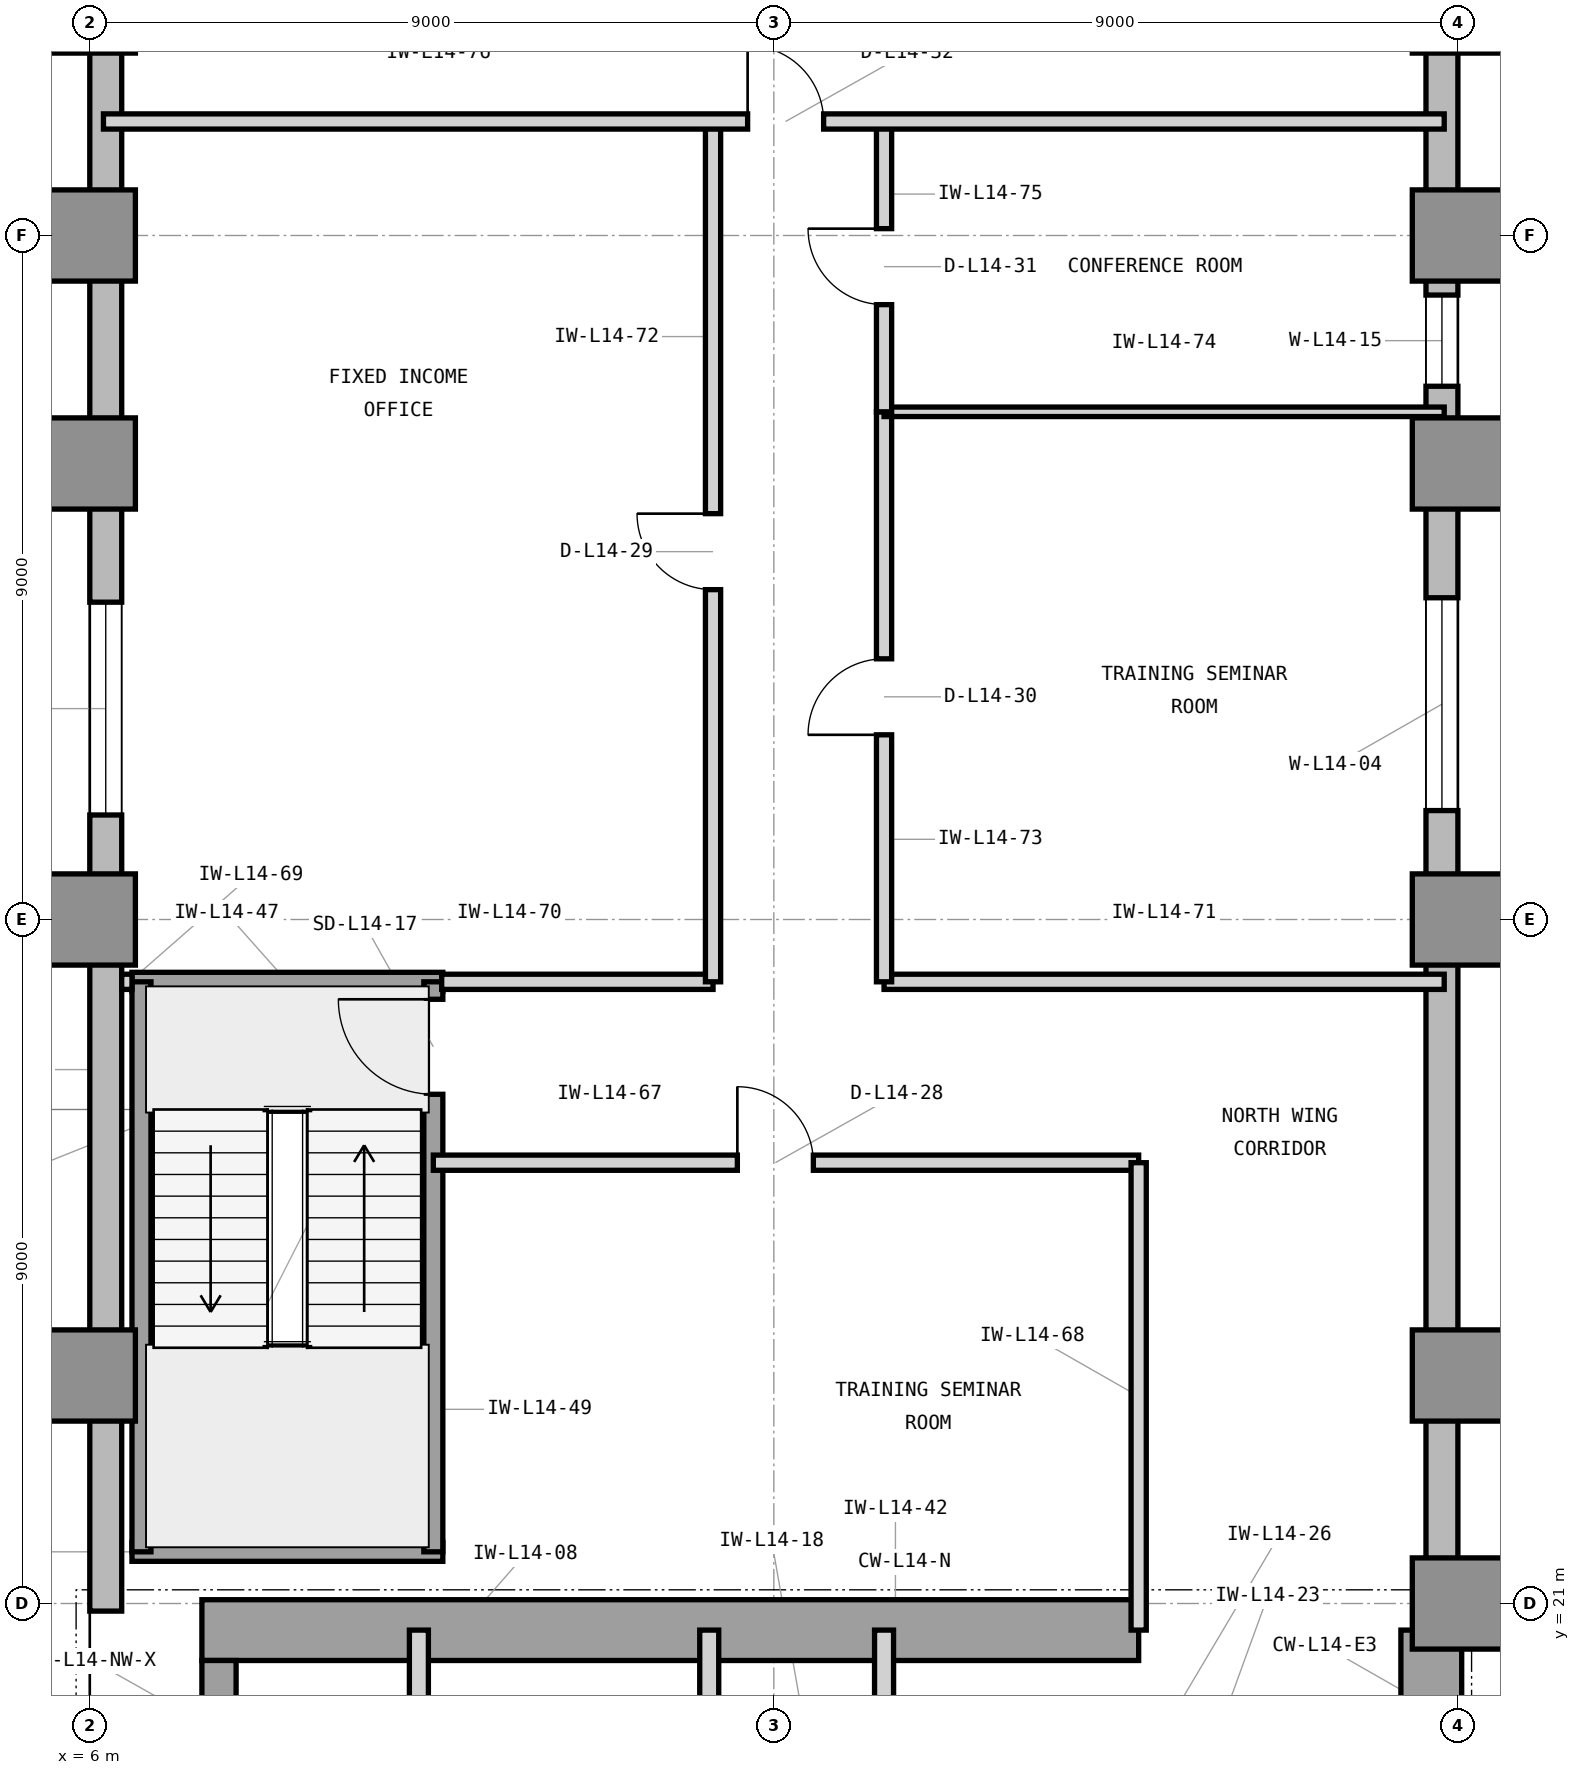
"""IFC4 building model, lengths in metres.
Left out: names, types, materials, properties, quantities, classifications, styles, units other than length and angle.
Written with IfcOpenShell. Run it as: python <this file> out.ifc"""

import sys

from ifc_helpers import new_model, si_unit, direction, frame, frame_2d, origin, origin_2d, place, context, subcontext, project, spatial, rectangle, extrude, element, fill, save


model = new_model("IFC4")
c1 = context("Model", 3, precision=1e-05, world=origin(), true_north=direction((0.0, 1.0)))
c2 = subcontext(c1, "Body", "Model", "MODEL_VIEW")
j1 = project(units=[si_unit("LENGTHUNIT", "METRE"), si_unit("PLANEANGLEUNIT", "RADIAN")], contexts=[c1])
p1 = place(None, origin())
s1 = spatial("IfcSite", under=j1, at=p1, CompositionType="ELEMENT")
p2 = place(p1, origin())
s2 = spatial("IfcBuilding", under=s1, at=p2, CompositionType="ELEMENT")
p3 = place(p2, frame((0.0, 0.0, 63.6)))
s3 = spatial("IfcBuildingStorey", under=s2, at=p3, CompositionType="ELEMENT", Elevation=63.6)
p4 = place(p3, frame((7.475, 20.65, 0.0), z_axis=(0.0, 0.0, 1.0), x_axis=(1.0, 0.0, 0.0)))
e1 = element("IfcWall", 1, at=p4, inside=s3, PredefinedType="SHEAR", context=c2, shape_type="SweptSolid", body=[
    extrude(rectangle(XDim=12.325, YDim=0.8, at=frame_2d((6.163, 0.0))), origin(), (0.0, 0.0, 1.0), 4.2),
])
p5 = place(p3, frame((23.65, 16.6, 0.0), z_axis=(0.0, 0.0, 1.0), x_axis=(0.0, 1.0, 0.0)))
e2 = element("IfcWall", 2, at=p5, inside=s3, PredefinedType="SHEAR", context=c2, shape_type="SweptSolid", body=[
    extrude(rectangle(XDim=4.05, YDim=0.8, at=frame_2d((2.025, 0.0))), origin(), (0.0, 0.0, 1.0), 4.2),
])
p6 = place(p3, frame((7.7, 19.575, 0.0), z_axis=(0.0, 0.0, 1.0), x_axis=(0.0, 1.0, 0.0)))
e3 = element("IfcWall", 3, at=p6, inside=s3, PredefinedType="SHEAR", context=c2, shape_type="SweptSolid", body=[
    extrude(rectangle(XDim=0.675, YDim=0.45, at=frame_2d((0.337, 0.0))), origin(), (0.0, 0.0, 1.0), 4.2),
])
for number, where, z_axis, x_axis in (
    (4, (24.0, 21.0, 0.0), (0.0, 0.0, 1.0), (1.0, 0.0, 0.0)),
    (5, (6.0, 24.0, 0.0), (0.0, 0.0, 1.0), (1.0, 0.0, 0.0)),
    (6, (24.0, 24.0, 0.0), (0.0, 0.0, 1.0), (1.0, 0.0, 0.0)),
    (7, (6.0, 30.0, 0.0), (0.0, 0.0, 1.0), (1.0, 0.0, 0.0)),
    (8, (24.0, 30.0, 0.0), (0.0, 0.0, 1.0), (1.0, 0.0, 0.0)),
    (9, (6.0, 36.0, 0.0), (0.0, 0.0, 1.0), (1.0, 0.0, 0.0)),
    (10, (24.0, 36.0, 0.0), (0.0, 0.0, 1.0), (1.0, 0.0, 0.0)),
    (11, (6.0, 39.0, 0.0), (0.0, 0.0, 1.0), (1.0, 0.0, 0.0)),
    (12, (24.0, 39.0, 0.0), (0.0, 0.0, 1.0), (1.0, 0.0, 0.0)),
    (13, (6.0, 42.0, 0.0), (0.0, 0.0, 1.0), (1.0, 0.0, 0.0)),
    (14, (24.0, 42.0, 0.0), (0.0, 0.0, 1.0), (1.0, 0.0, 0.0)),
):
    element("IfcColumn", number, at=place(p3, frame(where, z_axis=z_axis, x_axis=x_axis)), inside=s3, PredefinedType="COLUMN", context=c2, shape_type="SweptSolid", body=[
        extrude(rectangle(XDim=1.2, YDim=1.2, at=origin_2d()), origin(), (0.0, 0.0, 1.0), 4.2),
    ])
p7 = place(p3, frame((64.4, 20.79, 0.0), z_axis=(0.0, 0.0, 1.0), x_axis=(-1.0, 0.0, 0.0)))
e15 = element("IfcWall", 15, at=p7, inside=s3, PredefinedType="STANDARD", context=c2, shape_type="SweptSolid", body=[
    extrude(rectangle(XDim=40.4, YDim=0.42, at=frame_2d((20.2, 0.0))), origin(), (0.0, 0.0, 1.0), 3.98),
])
p8 = place(p7, frame((26.375, 0.0, 0.85)))
e16 = element("IfcOpeningElement", 16, at=p8, cuts=e15, PredefinedType="OPENING", context=c2, shape_type="SweptSolid", body=[
    extrude(rectangle(XDim=2.8, YDim=2.45, at=frame_2d((1.4, 1.225))), frame((0.0, 0.22, 0.0), z_axis=(0.0, -1.0, 0.0), x_axis=(1.0, 0.0, 0.0)), (0.0, 0.0, 1.0), 0.44),
])
p9 = place(p7, frame((38.222, 0.0, 0.85)))
e17 = element("IfcOpeningElement", 17, at=p9, cuts=e15, PredefinedType="OPENING", context=c2, shape_type="SweptSolid", body=[
    extrude(rectangle(XDim=1.2, YDim=2.45, at=frame_2d((0.6, 1.225))), frame((0.0, 0.22, 0.0), z_axis=(0.0, -1.0, 0.0), x_axis=(1.0, 0.0, 0.0)), (0.0, 0.0, 1.0), 0.44),
])
p10 = place(p7, frame((32.536, 0.0, 0.85)))
e18 = element("IfcOpeningElement", 18, at=p10, cuts=e15, PredefinedType="OPENING", context=c2, shape_type="SweptSolid", body=[
    extrude(rectangle(XDim=2.8, YDim=2.45, at=frame_2d((1.4, 1.225))), frame((0.0, 0.22, 0.0), z_axis=(0.0, -1.0, 0.0), x_axis=(1.0, 0.0, 0.0)), (0.0, 0.0, 1.0), 0.44),
])
p11 = place(p7, frame((17.386, 0.0, 0.85)))
e19 = element("IfcOpeningElement", 19, at=p11, cuts=e15, PredefinedType="OPENING", context=c2, shape_type="SweptSolid", body=[
    extrude(rectangle(XDim=2.8, YDim=2.45, at=frame_2d((1.4, 1.225))), frame((0.0, 0.22, 0.0), z_axis=(0.0, -1.0, 0.0), x_axis=(1.0, 0.0, 0.0)), (0.0, 0.0, 1.0), 0.44),
])
p12 = place(p3, frame((23.79, 21.0, 0.0), z_axis=(0.0, 0.0, 1.0), x_axis=(0.0, 1.0, 0.0)))
e20 = element("IfcWall", 20, at=p12, inside=s3, PredefinedType="STANDARD", context=c2, shape_type="SweptSolid", body=[
    extrude(rectangle(XDim=28.4, YDim=0.42, at=frame_2d((14.2, 0.0))), origin(), (0.0, 0.0, 1.0), 3.98),
])
p13 = place(p12, frame((10.433, 0.0, 0.85)))
e21 = element("IfcOpeningElement", 21, at=p13, cuts=e20, PredefinedType="OPENING", context=c2, shape_type="SweptSolid", body=[
    extrude(rectangle(XDim=2.8, YDim=2.45, at=frame_2d((1.4, 1.225))), frame((0.0, 0.22, 0.0), z_axis=(0.0, -1.0, 0.0), x_axis=(1.0, 0.0, 0.0)), (0.0, 0.0, 1.0), 0.44),
])
p14 = place(p12, frame((16.016, 0.0, 0.85)))
e22 = element("IfcOpeningElement", 22, at=p14, cuts=e20, PredefinedType="OPENING", context=c2, shape_type="SweptSolid", body=[
    extrude(rectangle(XDim=1.2, YDim=2.45, at=frame_2d((0.6, 1.225))), frame((0.0, 0.22, 0.0), z_axis=(0.0, -1.0, 0.0), x_axis=(1.0, 0.0, 0.0)), (0.0, 0.0, 1.0), 0.44),
])
p15 = place(p3, frame((6.21, 49.4, 0.0), z_axis=(0.0, 0.0, 1.0), x_axis=(0.0, -1.0, 0.0)))
e23 = element("IfcWall", 23, at=p15, inside=s3, PredefinedType="STANDARD", context=c2, shape_type="SweptSolid", body=[
    extrude(rectangle(XDim=28.5, YDim=0.42, at=frame_2d((14.25, 0.0))), origin(), (0.0, 0.0, 1.0), 3.98),
])
p16 = place(p15, frame((15.225, 0.0, 0.85)))
e24 = element("IfcOpeningElement", 24, at=p16, cuts=e23, PredefinedType="OPENING", context=c2, shape_type="SweptSolid", body=[
    extrude(rectangle(XDim=2.8, YDim=2.45, at=frame_2d((1.4, 1.225))), frame((0.0, 0.22, 0.0), z_axis=(0.0, -1.0, 0.0), x_axis=(1.0, 0.0, 0.0)), (0.0, 0.0, 1.0), 0.44),
])
p17 = place(p3, frame((10.33, 19.45, 0.0), z_axis=(0.0, 0.0, 1.0), x_axis=(0.0, 1.0, 0.0)))
e25 = element("IfcWall", 25, at=p17, inside=s3, PredefinedType="PARTITIONING", context=c2, shape_type="SweptSolid", body=[
    extrude(rectangle(XDim=1.2, YDim=0.25, at=frame_2d((0.6, 0.0))), origin(), (0.0, 0.0, 1.0), 3.114),
])
for number, where, z_axis, x_axis in (
    (26, (14.15, 16.7, 0.0), (0.0, 0.0, 1.0), (0.0, 1.0, 0.0)),
    (27, (16.45, 16.7, 0.0), (0.0, 0.0, 1.0), (0.0, 1.0, 0.0)),
):
    element("IfcWall", number, at=place(p3, frame(where, z_axis=z_axis, x_axis=x_axis)), inside=s3, PredefinedType="PARTITIONING", context=c2, shape_type="SweptSolid", body=[
        extrude(rectangle(XDim=3.95, YDim=0.25, at=frame_2d((1.975, 0.0))), origin(), (0.0, 0.0, 1.0), 3.97),
    ])
for number, where, z_axis, x_axis in (
    (28, (6.555, 21.68, 0.0), (0.0, 0.0, 1.0), (1.0, 0.0, 0.0)),
    (29, (6.555, 29.18, 0.0), (0.0, 0.0, 1.0), (1.0, 0.0, 0.0)),
):
    element("IfcWall", number, at=place(p3, frame(where, z_axis=z_axis, x_axis=x_axis)), inside=s3, PredefinedType="SHEAR", context=c2, shape_type="SweptSolid", body=[
        extrude(rectangle(XDim=4.09, YDim=0.25, at=frame_2d((2.045, 0.0))), origin(), (0.0, 0.0, 1.0), 4.2),
    ])
p18 = place(p3, frame((6.68, 21.68, 0.0), z_axis=(0.0, 0.0, 1.0), x_axis=(0.0, 1.0, 0.0)))
e30 = element("IfcWall", 30, at=p18, inside=s3, PredefinedType="SHEAR", context=c2, shape_type="SweptSolid", body=[
    extrude(rectangle(XDim=7.5, YDim=0.25, at=frame_2d((3.75, 0.0))), origin(), (0.0, 0.0, 1.0), 4.2),
])
p19 = place(p3, frame((10.52, 21.68, 0.0), z_axis=(0.0, 0.0, 1.0), x_axis=(0.0, 1.0, 0.0)))
e31 = element("IfcWall", 31, at=p19, inside=s3, PredefinedType="SHEAR", context=c2, shape_type="SweptSolid", body=[
    extrude(rectangle(XDim=7.5, YDim=0.25, at=frame_2d((3.75, 0.0))), origin(), (0.0, 0.0, 1.0), 4.2),
])
p20 = place(p19, frame((6.02, 0.0, 0.0)))
e32 = element("IfcOpeningElement", 32, at=p20, cuts=e31, PredefinedType="OPENING", context=c2, shape_type="SweptSolid", body=[
    extrude(rectangle(XDim=1.25, YDim=2.2, at=frame_2d((0.625, 1.1))), frame((0.0, 0.135, 0.0), z_axis=(0.0, -1.0, 0.0), x_axis=(1.0, 0.0, 0.0)), (0.0, 0.0, 1.0), 0.27),
])
p21 = place(p3, frame((10.52, 26.8, 0.0), z_axis=(0.0, 0.0, 1.0), x_axis=(1.0, 0.0, 0.0)))
e33 = element("IfcWall", 33, at=p21, inside=s3, PredefinedType="PARTITIONING", context=c2, shape_type="SweptSolid", body=[
    extrude(rectangle(XDim=9.28, YDim=0.2, at=frame_2d((4.64, 0.0))), origin(), (0.0, 0.0, 1.0), 3.97),
])
p22 = place(p21, frame((4.0, 0.0, 0.0)))
e34 = element("IfcOpeningElement", 34, at=p22, cuts=e33, PredefinedType="OPENING", context=c2, shape_type="SweptSolid", body=[
    extrude(rectangle(XDim=1.0, YDim=2.15, at=frame_2d((0.5, 1.075))), frame((0.0, 0.11, 0.0), z_axis=(0.0, -1.0, 0.0), x_axis=(1.0, 0.0, 0.0)), (0.0, 0.0, 1.0), 0.22),
])
p23 = place(p3, frame((19.8, 20.65, 0.0), z_axis=(0.0, 0.0, 1.0), x_axis=(0.0, 1.0, 0.0)))
e35 = element("IfcWall", 35, at=p23, inside=s3, PredefinedType="PARTITIONING", context=c2, shape_type="SweptSolid", body=[
    extrude(rectangle(XDim=6.15, YDim=0.2, at=frame_2d((3.075, 0.0))), origin(), (0.0, 0.0, 1.0), 3.97),
])
p24 = place(p3, frame((6.42, 29.18, 0.0), z_axis=(0.0, 0.0, 1.0), x_axis=(1.0, 0.0, 0.0)))
e36 = element("IfcWall", 36, at=p24, inside=s3, PredefinedType="PARTITIONING", context=c2, shape_type="SweptSolid", body=[
    extrude(rectangle(XDim=0.135, YDim=0.2, at=frame_2d((0.067, 0.0))), origin(), (0.0, 0.0, 1.0), 3.97),
])
p25 = place(p3, frame((10.63, 29.18, 0.0), z_axis=(0.0, 0.0, 1.0), x_axis=(1.0, 0.0, 0.0)))
e37 = element("IfcWall", 37, at=p25, inside=s3, PredefinedType="PARTITIONING", context=c2, shape_type="SweptSolid", body=[
    extrude(rectangle(XDim=3.57, YDim=0.2, at=frame_2d((1.785, 0.0))), origin(), (0.0, 0.0, 1.0), 3.97),
])
p26 = place(p3, frame((16.45, 29.18, 0.0), z_axis=(0.0, 0.0, 1.0), x_axis=(1.0, 0.0, 0.0)))
e38 = element("IfcWall", 38, at=p26, inside=s3, PredefinedType="PARTITIONING", context=c2, shape_type="SweptSolid", body=[
    extrude(rectangle(XDim=7.37, YDim=0.2, at=frame_2d((3.685, 0.0))), origin(), (0.0, 0.0, 1.0), 3.97),
])
p27 = place(p3, frame((14.2, 29.18, 0.0), z_axis=(0.0, 0.0, 1.0), x_axis=(0.0, 1.0, 0.0)))
e39 = element("IfcWall", 39, at=p27, inside=s3, PredefinedType="PARTITIONING", context=c2, shape_type="SweptSolid", body=[
    extrude(rectangle(XDim=11.32, YDim=0.2, at=frame_2d((5.66, 0.0))), origin(), (0.0, 0.0, 1.0), 3.97),
])
p28 = place(p27, frame((5.16, 0.0, 0.0)))
e40 = element("IfcOpeningElement", 40, at=p28, cuts=e39, PredefinedType="OPENING", context=c2, shape_type="SweptSolid", body=[
    extrude(rectangle(XDim=1.0, YDim=2.15, at=frame_2d((0.5, 1.075))), frame((0.0, 0.11, 0.0), z_axis=(0.0, -1.0, 0.0), x_axis=(1.0, 0.0, 0.0)), (0.0, 0.0, 1.0), 0.22),
])
p29 = place(p3, frame((16.45, 29.18, 0.0), z_axis=(0.0, 0.0, 1.0), x_axis=(0.0, 1.0, 0.0)))
e41 = element("IfcWall", 41, at=p29, inside=s3, PredefinedType="PARTITIONING", context=c2, shape_type="SweptSolid", body=[
    extrude(rectangle(XDim=7.5, YDim=0.2, at=frame_2d((3.75, 0.0))), origin(), (0.0, 0.0, 1.0), 3.97),
])
p30 = place(p29, frame((3.25, 0.0, 0.0)))
e42 = element("IfcOpeningElement", 42, at=p30, cuts=e41, PredefinedType="OPENING", context=c2, shape_type="SweptSolid", body=[
    extrude(rectangle(XDim=1.0, YDim=2.15, at=frame_2d((0.5, 1.075))), frame((0.0, 0.11, 0.0), z_axis=(0.0, -1.0, 0.0), x_axis=(1.0, 0.0, 0.0)), (0.0, 0.0, 1.0), 0.22),
])
p31 = place(p3, frame((16.45, 36.68, 0.0), z_axis=(0.0, 0.0, 1.0), x_axis=(1.0, 0.0, 0.0)))
e43 = element("IfcWall", 43, at=p31, inside=s3, PredefinedType="PARTITIONING", context=c2, shape_type="SweptSolid", body=[
    extrude(rectangle(XDim=7.37, YDim=0.125, at=frame_2d((3.685, 0.0))), origin(), (0.0, 0.0, 1.0), 3.97),
])
p32 = place(p3, frame((16.45, 36.68, 0.0), z_axis=(0.0, 0.0, 1.0), x_axis=(0.0, 1.0, 0.0)))
e44 = element("IfcWall", 44, at=p32, inside=s3, PredefinedType="PARTITIONING", context=c2, shape_type="SweptSolid", body=[
    extrude(rectangle(XDim=3.82, YDim=0.2, at=frame_2d((1.91, 0.0))), origin(), (0.0, 0.0, 1.0), 3.97),
])
p33 = place(p32, frame((1.41, 0.0, 0.0)))
e45 = element("IfcOpeningElement", 45, at=p33, cuts=e44, PredefinedType="OPENING", context=c2, shape_type="SweptSolid", body=[
    extrude(rectangle(XDim=1.0, YDim=2.15, at=frame_2d((0.5, 1.075))), frame((0.0, 0.11, 0.0), z_axis=(0.0, -1.0, 0.0), x_axis=(1.0, 0.0, 0.0)), (0.0, 0.0, 1.0), 0.22),
])
p34 = place(p3, frame((6.18, 40.5, 0.0), z_axis=(0.0, 0.0, 1.0), x_axis=(1.0, 0.0, 0.0)))
e46 = element("IfcWall", 46, at=p34, inside=s3, PredefinedType="PARTITIONING", context=c2, shape_type="SweptSolid", body=[
    extrude(rectangle(XDim=17.64, YDim=0.2, at=frame_2d((8.82, 0.0))), origin(), (0.0, 0.0, 1.0), 3.97),
])
p35 = place(p34, frame((8.475, 0.0, 0.0)))
e47 = element("IfcOpeningElement", 47, at=p35, cuts=e46, PredefinedType="OPENING", context=c2, shape_type="SweptSolid", body=[
    extrude(rectangle(XDim=1.0, YDim=2.15, at=frame_2d((0.5, 1.075))), frame((0.0, 0.11, 0.0), z_axis=(0.0, -1.0, 0.0), x_axis=(1.0, 0.0, 0.0)), (0.0, 0.0, 1.0), 0.22),
])
p36 = place(p13, origin())
e48 = element("IfcWindow", 48, at=p36, inside=s3, PartitioningType="SINGLE_PANEL", PredefinedType="WINDOW", context=c2, shape_type="SweptSolid", body=[
    extrude(rectangle(XDim=2.8, YDim=2.45, at=frame_2d((1.4, 1.225))), frame((0.0, 0.11, 0.0), z_axis=(0.0, -1.0, 0.0), x_axis=(1.0, 0.0, 0.0)), (0.0, 0.0, 1.0), 0.06),
])
fill(e21, e48)
p37 = place(p16, origin())
e49 = element("IfcWindow", 49, at=p37, inside=s3, PartitioningType="SINGLE_PANEL", PredefinedType="WINDOW", context=c2, shape_type="SweptSolid", body=[
    extrude(rectangle(XDim=2.8, YDim=2.45, at=frame_2d((1.4, 1.225))), frame((0.0, 0.11, 0.0), z_axis=(0.0, -1.0, 0.0), x_axis=(1.0, 0.0, 0.0)), (0.0, 0.0, 1.0), 0.06),
])
fill(e24, e49)
p38 = place(p20, origin())
e50 = element("IfcDoor", 50, at=p38, inside=s3, OperationType="SINGLE_SWING_RIGHT", PredefinedType="DOOR", context=c2, shape_type="SweptSolid", body=[
    extrude(rectangle(XDim=1.25, YDim=2.2, at=frame_2d((0.625, 1.1))), frame((0.0, 0.025, 0.0), z_axis=(0.0, -1.0, 0.0), x_axis=(1.0, 0.0, 0.0)), (0.0, 0.0, 1.0), 0.05),
])
fill(e32, e50)
p39 = place(p22, origin())
e51 = element("IfcDoor", 51, at=p39, inside=s3, OperationType="SINGLE_SWING_LEFT", PredefinedType="DOOR", context=c2, shape_type="SweptSolid", body=[
    extrude(rectangle(XDim=1.0, YDim=2.15, at=frame_2d((0.5, 1.075))), frame((0.0, 0.025, 0.0), z_axis=(0.0, -1.0, 0.0), x_axis=(1.0, 0.0, 0.0)), (0.0, 0.0, 1.0), 0.05),
])
fill(e34, e51)
p40 = place(p28, origin())
e52 = element("IfcDoor", 52, at=p40, inside=s3, OperationType="SINGLE_SWING_RIGHT", PredefinedType="DOOR", context=c2, shape_type="SweptSolid", body=[
    extrude(rectangle(XDim=1.0, YDim=2.15, at=frame_2d((0.5, 1.075))), frame((0.0, 0.025, 0.0), z_axis=(0.0, -1.0, 0.0), x_axis=(1.0, 0.0, 0.0)), (0.0, 0.0, 1.0), 0.05),
])
fill(e40, e52)
p41 = place(p30, origin())
e53 = element("IfcDoor", 53, at=p41, inside=s3, OperationType="SINGLE_SWING_LEFT", PredefinedType="DOOR", context=c2, shape_type="SweptSolid", body=[
    extrude(rectangle(XDim=1.0, YDim=2.15, at=frame_2d((0.5, 1.075))), frame((0.0, 0.025, 0.0), z_axis=(0.0, -1.0, 0.0), x_axis=(1.0, 0.0, 0.0)), (0.0, 0.0, 1.0), 0.05),
])
fill(e42, e53)
p42 = place(p33, origin())
e54 = element("IfcDoor", 54, at=p42, inside=s3, OperationType="SINGLE_SWING_RIGHT", PredefinedType="DOOR", context=c2, shape_type="SweptSolid", body=[
    extrude(rectangle(XDim=1.0, YDim=2.15, at=frame_2d((0.5, 1.075))), frame((0.0, 0.025, 0.0), z_axis=(0.0, -1.0, 0.0), x_axis=(1.0, 0.0, 0.0)), (0.0, 0.0, 1.0), 0.05),
])
fill(e45, e54)
p43 = place(p35, origin())
e55 = element("IfcDoor", 55, at=p43, inside=s3, OperationType="SINGLE_SWING_LEFT", PredefinedType="DOOR", context=c2, shape_type="SweptSolid", body=[
    extrude(rectangle(XDim=1.0, YDim=2.15, at=frame_2d((0.5, 1.075))), frame((0.0, 0.025, 0.0), z_axis=(0.0, -1.0, 0.0), x_axis=(1.0, 0.0, 0.0)), (0.0, 0.0, 1.0), 0.05),
])
fill(e47, e55)
p44 = place(p14, origin())
e56 = element("IfcWindow", 56, at=p44, inside=s3, PartitioningType="SINGLE_PANEL", PredefinedType="WINDOW", context=c2, shape_type="SweptSolid", body=[
    extrude(rectangle(XDim=1.2, YDim=2.45, at=frame_2d((0.6, 1.225))), frame((0.0, 0.11, 0.0), z_axis=(0.0, -1.0, 0.0), x_axis=(1.0, 0.0, 0.0)), (0.0, 0.0, 1.0), 0.06),
])
fill(e22, e56)
save(model, sys.argv[1])
